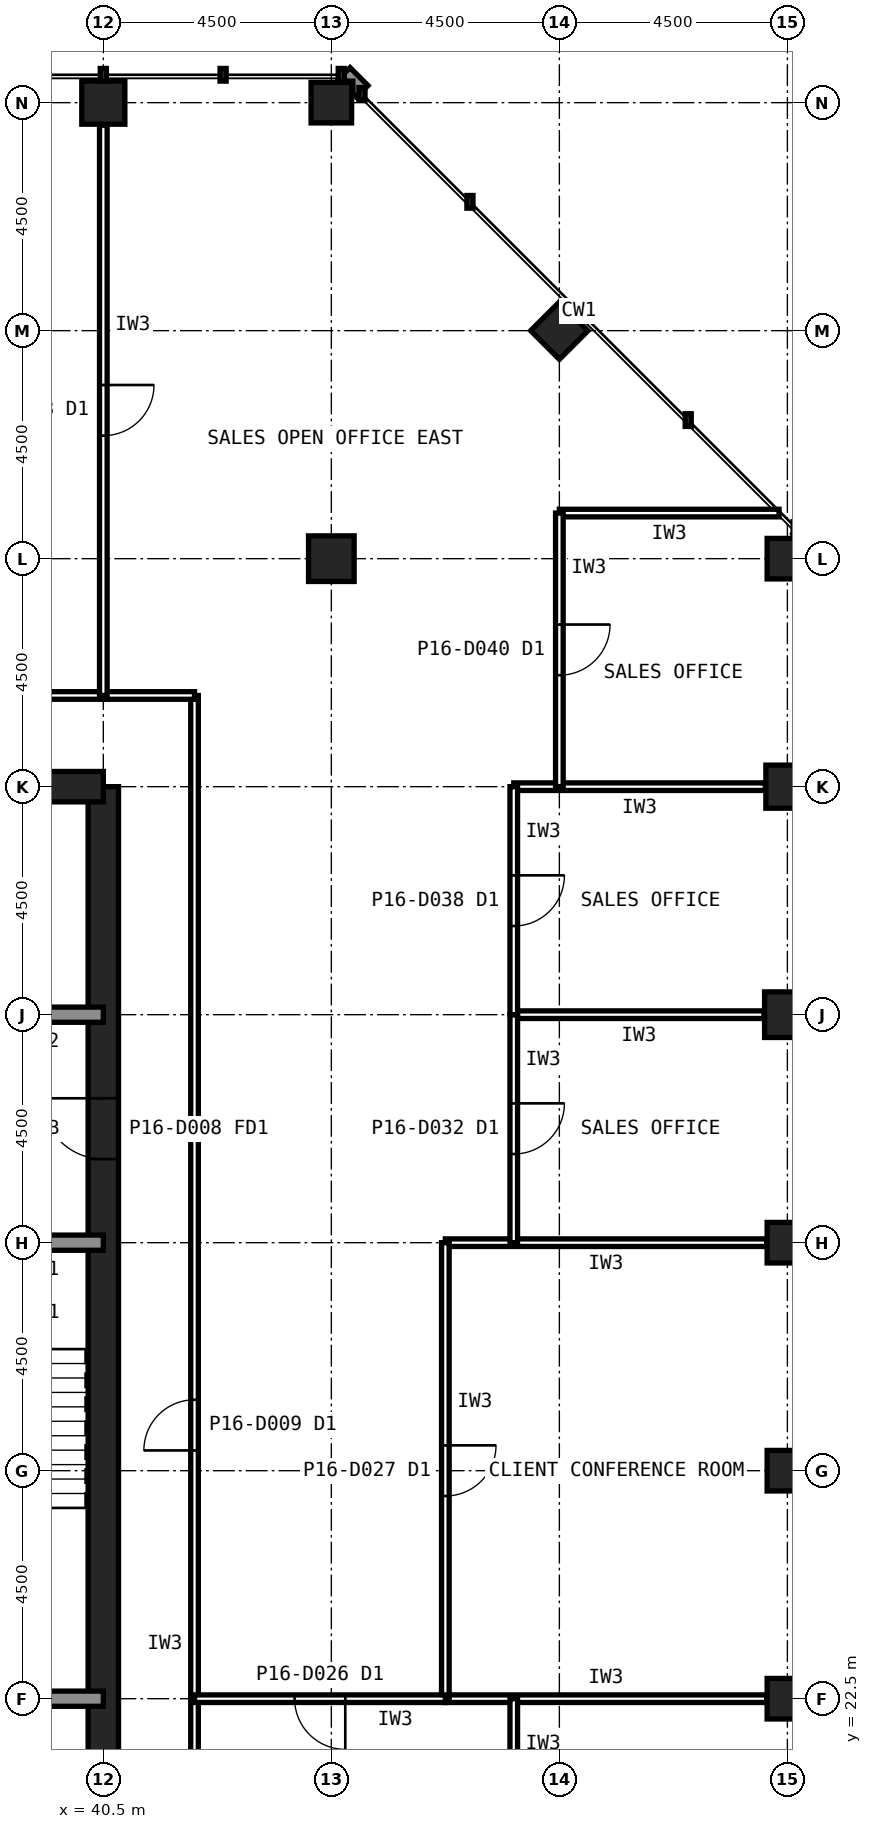
"""IFC4 building model, lengths in metres.
Left out: names, types, materials, properties, quantities, classifications, styles, units other than length and angle.
Written with IfcOpenShell. Run it as: python <this file> out.ifc"""

import sys

from ifc_helpers import new_model, si_unit, direction, frame, frame_2d, origin, origin_2d, place, context, subcontext, project, spatial, rectangle, hollow_rectangle, extrude, element, fill, save


model = new_model("IFC4")
c1 = context("Model", 3, precision=1e-05, world=origin(), true_north=direction((0.0, 1.0)))
c2 = subcontext(c1, "Body", "Model", "MODEL_VIEW")
j1 = project(units=[si_unit("LENGTHUNIT", "METRE"), si_unit("PLANEANGLEUNIT", "RADIAN")], contexts=[c1])
p1 = place(None, origin())
s1 = spatial("IfcSite", under=j1, at=p1, CompositionType="ELEMENT")
p2 = place(p1, origin())
s2 = spatial("IfcBuilding", under=s1, at=p2, CompositionType="ELEMENT")
p3 = place(p2, frame((0.0, 0.0, 71.0)))
s3 = spatial("IfcBuildingStorey", under=s2, at=p3, CompositionType="ELEMENT", Elevation=71.0)
for number, where, z_axis, x_axis in (
    (1, (54.0, 22.5, 0.0), (0.0, 0.0, 1.0), (1.0, 0.0, 0.0)),
    (2, (54.0, 27.0, 0.0), (0.0, 0.0, 1.0), (1.0, 0.0, 0.0)),
    (3, (54.0, 31.5, 0.0), (0.0, 0.0, 1.0), (1.0, 0.0, 0.0)),
):
    element("IfcColumn", number, at=place(p3, frame(where, z_axis=z_axis, x_axis=x_axis)), inside=s3, PredefinedType="COLUMN", context=c2, shape_type="SweptSolid", body=[
        extrude(hollow_rectangle(XDim=0.8, YDim=0.8, WallThickness=0.045, at=origin_2d()), origin(), (0.0, 0.0, 1.0), 4.2),
    ])
p4 = place(p3, frame((54.0, 36.0, 0.0), z_axis=(0.0, 0.0, 1.0), x_axis=(1.0, 0.0, 0.0)))
e4 = element("IfcColumn", 4, at=p4, inside=s3, PredefinedType="COLUMN", context=c2, shape_type="SweptSolid", body=[
    extrude(hollow_rectangle(XDim=0.9, YDim=0.9, WallThickness=0.063, at=origin_2d()), origin(), (0.0, 0.0, 1.0), 4.2),
])
p5 = place(p3, frame((54.0, 40.5, 0.0), z_axis=(0.0, 0.0, 1.0), x_axis=(1.0, 0.0, 0.0)))
e5 = element("IfcColumn", 5, at=p5, inside=s3, PredefinedType="COLUMN", context=c2, shape_type="SweptSolid", body=[
    extrude(hollow_rectangle(XDim=0.85, YDim=0.85, WallThickness=0.05, at=origin_2d()), origin(), (0.0, 0.0, 1.0), 4.2),
])
for number, where, z_axis, x_axis in (
    (6, (54.0, 45.0, 0.0), (0.0, 0.0, 1.0), (1.0, 0.0, 0.0)),
    (7, (45.0, 54.0, 0.0), (0.0, 0.0, 1.0), (1.0, 0.0, 0.0)),
):
    element("IfcColumn", number, at=place(p3, frame(where, z_axis=z_axis, x_axis=x_axis)), inside=s3, PredefinedType="COLUMN", context=c2, shape_type="SweptSolid", body=[
        extrude(hollow_rectangle(XDim=0.8, YDim=0.8, WallThickness=0.045, at=origin_2d()), origin(), (0.0, 0.0, 1.0), 4.2),
    ])
p6 = place(p3, frame((40.5, 54.0, 0.0), z_axis=(0.0, 0.0, 1.0), x_axis=(1.0, 0.0, 0.0)))
e8 = element("IfcColumn", 8, at=p6, inside=s3, PredefinedType="COLUMN", context=c2, shape_type="SweptSolid", body=[
    extrude(hollow_rectangle(XDim=0.85, YDim=0.85, WallThickness=0.05, at=origin_2d()), origin(), (0.0, 0.0, 1.0), 4.2),
])
p7 = place(p3, frame((49.5, 49.5, 0.0), z_axis=(0.0, 0.0, 1.0), x_axis=(0.707106781187, 0.707106781187, 0.0)))
e9 = element("IfcColumn", 9, at=p7, inside=s3, PredefinedType="COLUMN", context=c2, shape_type="SweptSolid", body=[
    extrude(hollow_rectangle(XDim=0.8, YDim=0.8, WallThickness=0.045, at=origin_2d()), origin(), (0.0, 0.0, 1.0), 4.2),
])
p8 = place(p3, frame((45.0, 45.0, 0.0), z_axis=(0.0, 0.0, 1.0), x_axis=(1.0, 0.0, 0.0)))
e10 = element("IfcColumn", 10, at=p8, inside=s3, PredefinedType="COLUMN", context=c2, shape_type="SweptSolid", body=[
    extrude(hollow_rectangle(XDim=0.9, YDim=0.9, WallThickness=0.063, at=origin_2d()), origin(), (0.0, 0.0, 1.0), 4.2),
])
p9 = place(p3, frame((40.5, 13.5, 0.0), z_axis=(0.0, 0.0, 1.0), x_axis=(0.0, 1.0, 0.0)))
e11 = element("IfcWall", 11, at=p9, inside=s3, PredefinedType="SHEAR", context=c2, shape_type="SweptSolid", body=[
    extrude(rectangle(XDim=27.0, YDim=0.6, at=frame_2d((13.5, 0.0))), origin(), (0.0, 0.0, 1.0), 4.2),
])
p10 = place(p9, frame((5.85, 0.0, 0.0)))
e12 = element("IfcOpeningElement", 12, at=p10, cuts=e11, PredefinedType="OPENING", context=c2, shape_type="SweptSolid", body=[
    extrude(rectangle(XDim=1.8, YDim=2.1, at=frame_2d((0.9, 1.05))), frame((0.0, 0.31, 0.0), z_axis=(0.0, -1.0, 0.0), x_axis=(1.0, 0.0, 0.0)), (0.0, 0.0, 1.0), 0.62),
])
p11 = place(p9, frame((19.65, 0.0, 0.0)))
e13 = element("IfcOpeningElement", 13, at=p11, cuts=e11, PredefinedType="OPENING", context=c2, shape_type="SweptSolid", body=[
    extrude(rectangle(XDim=1.2, YDim=2.1, at=frame_2d((0.6, 1.05))), frame((0.0, 0.31, 0.0), z_axis=(0.0, -1.0, 0.0), x_axis=(1.0, 0.0, 0.0)), (0.0, 0.0, 1.0), 0.62),
])
p12 = place(p3, frame((40.5, 40.5, 0.0), z_axis=(0.0, 0.0, 1.0), x_axis=(-1.0, 0.0, 0.0)))
e14 = element("IfcWall", 14, at=p12, inside=s3, PredefinedType="SHEAR", context=c2, shape_type="SweptSolid", body=[
    extrude(rectangle(XDim=27.0, YDim=0.6, at=frame_2d((13.5, 0.0))), origin(), (0.0, 0.0, 1.0), 4.2),
])
p13 = place(p3, frame((13.5, 36.0, 0.0), z_axis=(0.0, 0.0, 1.0), x_axis=(1.0, 0.0, 0.0)))
e15 = element("IfcWall", 15, at=p13, inside=s3, PredefinedType="SOLIDWALL", context=c2, shape_type="SweptSolid", body=[
    extrude(rectangle(XDim=27.0, YDim=0.3, at=frame_2d((13.5, 0.0))), origin(), (0.0, 0.0, 1.0), 4.04),
])
p14 = place(p13, frame((1.8, 0.0, 0.0)))
e16 = element("IfcOpeningElement", 16, at=p14, cuts=e15, PredefinedType="OPENING", context=c2, shape_type="SweptSolid", body=[
    extrude(rectangle(XDim=0.9, YDim=2.1, at=frame_2d((0.45, 1.05))), frame((0.0, 0.16, 0.0), z_axis=(0.0, -1.0, 0.0), x_axis=(1.0, 0.0, 0.0)), (0.0, 0.0, 1.0), 0.32),
])
p15 = place(p13, frame((24.1, 0.0, 0.0)))
e17 = element("IfcOpeningElement", 17, at=p15, cuts=e15, PredefinedType="OPENING", context=c2, shape_type="SweptSolid", body=[
    extrude(rectangle(XDim=1.3, YDim=2.2, at=frame_2d((0.65, 1.1))), frame((0.0, 0.16, 0.0), z_axis=(0.0, -1.0, 0.0), x_axis=(1.0, 0.0, 0.0)), (0.0, 0.0, 1.0), 0.32),
])
p16 = place(p3, frame((13.5, 22.5, 0.0), z_axis=(0.0, 0.0, 1.0), x_axis=(1.0, 0.0, 0.0)))
e18 = element("IfcWall", 18, at=p16, inside=s3, PredefinedType="SOLIDWALL", context=c2, shape_type="SweptSolid", body=[
    extrude(rectangle(XDim=27.0, YDim=0.3, at=frame_2d((13.5, 0.0))), origin(), (0.0, 0.0, 1.0), 4.04),
])
p17 = place(p16, frame((1.65, 0.0, 0.0)))
e19 = element("IfcOpeningElement", 19, at=p17, cuts=e18, PredefinedType="OPENING", context=c2, shape_type="SweptSolid", body=[
    extrude(rectangle(XDim=1.2, YDim=2.1, at=frame_2d((0.6, 1.05))), frame((0.0, 0.16, 0.0), z_axis=(0.0, -1.0, 0.0), x_axis=(1.0, 0.0, 0.0)), (0.0, 0.0, 1.0), 0.32),
])
p18 = place(p16, frame((6.025, 0.0, 0.0)))
e20 = element("IfcOpeningElement", 20, at=p18, cuts=e18, PredefinedType="OPENING", context=c2, shape_type="SweptSolid", body=[
    extrude(rectangle(XDim=1.0, YDim=2.1, at=frame_2d((0.5, 1.05))), frame((0.0, 0.16, 0.0), z_axis=(0.0, -1.0, 0.0), x_axis=(1.0, 0.0, 0.0)), (0.0, 0.0, 1.0), 0.32),
])
p19 = place(p16, frame((10.525, 0.0, 0.0)))
e21 = element("IfcOpeningElement", 21, at=p19, cuts=e18, PredefinedType="OPENING", context=c2, shape_type="SweptSolid", body=[
    extrude(rectangle(XDim=1.0, YDim=2.1, at=frame_2d((0.5, 1.05))), frame((0.0, 0.16, 0.0), z_axis=(0.0, -1.0, 0.0), x_axis=(1.0, 0.0, 0.0)), (0.0, 0.0, 1.0), 0.32),
])
p20 = place(p16, frame((19.75, 0.0, 0.0)))
e22 = element("IfcOpeningElement", 22, at=p20, cuts=e18, PredefinedType="OPENING", context=c2, shape_type="SweptSolid", body=[
    extrude(rectangle(XDim=1.0, YDim=2.1, at=frame_2d((0.5, 1.05))), frame((0.0, 0.16, 0.0), z_axis=(0.0, -1.0, 0.0), x_axis=(1.0, 0.0, 0.0)), (0.0, 0.0, 1.0), 0.32),
])
p21 = place(p16, frame((15.05, 0.0, 0.0)))
e23 = element("IfcOpeningElement", 23, at=p21, cuts=e18, PredefinedType="OPENING", context=c2, shape_type="SweptSolid", body=[
    extrude(rectangle(XDim=1.4, YDim=2.4, at=frame_2d((0.7, 1.2))), frame((0.0, 0.16, 0.0), z_axis=(0.0, -1.0, 0.0), x_axis=(1.0, 0.0, 0.0)), (0.0, 0.0, 1.0), 0.32),
])
p22 = place(p3, frame((13.5, 31.5, 0.0), z_axis=(0.0, 0.0, 1.0), x_axis=(1.0, 0.0, 0.0)))
e24 = element("IfcWall", 24, at=p22, inside=s3, PredefinedType="SOLIDWALL", context=c2, shape_type="SweptSolid", body=[
    extrude(rectangle(XDim=27.0, YDim=0.3, at=frame_2d((13.5, 0.0))), origin(), (0.0, 0.0, 1.0), 4.04),
])
p23 = place(p22, frame((24.15, 0.0, 0.0)))
e25 = element("IfcOpeningElement", 25, at=p23, cuts=e24, PredefinedType="OPENING", context=c2, shape_type="SweptSolid", body=[
    extrude(rectangle(XDim=1.2, YDim=2.1, at=frame_2d((0.6, 1.05))), frame((0.0, 0.16, 0.0), z_axis=(0.0, -1.0, 0.0), x_axis=(1.0, 0.0, 0.0)), (0.0, 0.0, 1.0), 0.32),
])
p24 = place(p22, frame((15.3, 0.0, 0.0)))
e26 = element("IfcOpeningElement", 26, at=p24, cuts=e24, PredefinedType="OPENING", context=c2, shape_type="SweptSolid", body=[
    extrude(rectangle(XDim=0.9, YDim=2.1, at=frame_2d((0.45, 1.05))), frame((0.0, 0.16, 0.0), z_axis=(0.0, -1.0, 0.0), x_axis=(1.0, 0.0, 0.0)), (0.0, 0.0, 1.0), 0.32),
])
p25 = place(p22, frame((19.8, 0.0, 0.0)))
e27 = element("IfcOpeningElement", 27, at=p25, cuts=e24, PredefinedType="OPENING", context=c2, shape_type="SweptSolid", body=[
    extrude(rectangle(XDim=0.9, YDim=2.1, at=frame_2d((0.45, 1.05))), frame((0.0, 0.16, 0.0), z_axis=(0.0, -1.0, 0.0), x_axis=(1.0, 0.0, 0.0)), (0.0, 0.0, 1.0), 0.32),
])
p26 = place(p3, frame((42.3, 13.5, 0.0), z_axis=(0.0, 0.0, 1.0), x_axis=(0.0, 1.0, 0.0)))
e28 = element("IfcWall", 28, at=p26, inside=s3, PredefinedType="PARTITIONING", context=c2, shape_type="SweptSolid", body=[
    extrude(rectangle(XDim=28.8, YDim=0.15, at=frame_2d((14.4, 0.0))), origin(), (0.0, 0.0, 1.0), 4.04),
])
p27 = place(p26, frame((13.9, 0.0, 0.0)))
e29 = element("IfcOpeningElement", 29, at=p27, cuts=e28, PredefinedType="OPENING", context=c2, shape_type="SweptSolid", body=[
    extrude(rectangle(XDim=1.0, YDim=2.1, at=frame_2d((0.5, 1.05))), frame((0.0, 0.085, 0.0), z_axis=(0.0, -1.0, 0.0), x_axis=(1.0, 0.0, 0.0)), (0.0, 0.0, 1.0), 0.17),
])
p28 = place(p3, frame((42.3, 42.3, 0.0), z_axis=(0.0, 0.0, 1.0), x_axis=(-1.0, 0.0, 0.0)))
e30 = element("IfcWall", 30, at=p28, inside=s3, PredefinedType="PARTITIONING", context=c2, shape_type="SweptSolid", body=[
    extrude(rectangle(XDim=13.5, YDim=0.15, at=frame_2d((6.75, 0.0))), origin(), (0.0, 0.0, 1.0), 4.04),
])
p29 = place(p28, frame((6.25, 0.0, 0.0)))
e31 = element("IfcOpeningElement", 31, at=p29, cuts=e30, PredefinedType="OPENING", context=c2, shape_type="SweptSolid", body=[
    extrude(rectangle(XDim=1.0, YDim=2.1, at=frame_2d((0.5, 1.05))), frame((0.0, 0.085, 0.0), z_axis=(0.0, -1.0, 0.0), x_axis=(1.0, 0.0, 0.0)), (0.0, 0.0, 1.0), 0.17),
])
for number, where, z_axis, x_axis in (
    (32, (47.25, 22.5, 0.0), (0.0, 0.0, 1.0), (1.0, 0.0, 0.0)),
    (33, (53.59, 31.5, 0.0), (0.0, 0.0, 1.0), (-1.0, 0.0, 0.0)),
):
    element("IfcWall", number, at=place(p3, frame(where, z_axis=z_axis, x_axis=x_axis)), inside=s3, PredefinedType="PARTITIONING", context=c2, shape_type="SweptSolid", body=[
        extrude(rectangle(XDim=6.34, YDim=0.15, at=frame_2d((3.17, 0.0))), origin(), (0.0, 0.0, 1.0), 3.189),
    ])
p30 = place(p3, frame((47.25, 31.5, 0.0), z_axis=(0.0, 0.0, 1.0), x_axis=(0.0, -1.0, 0.0)))
e34 = element("IfcWall", 34, at=p30, inside=s3, PredefinedType="PARTITIONING", context=c2, shape_type="SweptSolid", body=[
    extrude(rectangle(XDim=9.0, YDim=0.15, at=frame_2d((4.5, 0.0))), origin(), (0.0, 0.0, 1.0), 4.04),
])
p31 = place(p30, frame((4.0, 0.0, 0.0)))
e35 = element("IfcOpeningElement", 35, at=p31, cuts=e34, PredefinedType="OPENING", context=c2, shape_type="SweptSolid", body=[
    extrude(rectangle(XDim=1.0, YDim=2.1, at=frame_2d((0.5, 1.05))), frame((0.0, 0.085, 0.0), z_axis=(0.0, -1.0, 0.0), x_axis=(1.0, 0.0, 0.0)), (0.0, 0.0, 1.0), 0.17),
])
p32 = place(p3, frame((48.6, 22.5, 0.0), z_axis=(0.0, 0.0, 1.0), x_axis=(0.0, -1.0, 0.0)))
e36 = element("IfcWall", 36, at=p32, inside=s3, PredefinedType="PARTITIONING", context=c2, shape_type="SweptSolid", body=[
    extrude(rectangle(XDim=4.5, YDim=0.15, at=frame_2d((2.25, 0.0))), origin(), (0.0, 0.0, 1.0), 4.04),
])
p33 = place(p32, frame((1.75, 0.0, 0.0)))
e37 = element("IfcOpeningElement", 37, at=p33, cuts=e36, PredefinedType="OPENING", context=c2, shape_type="SweptSolid", body=[
    extrude(rectangle(XDim=1.0, YDim=2.1, at=frame_2d((0.5, 1.05))), frame((0.0, 0.085, 0.0), z_axis=(0.0, -1.0, 0.0), x_axis=(1.0, 0.0, 0.0)), (0.0, 0.0, 1.0), 0.17),
])
p34 = place(p3, frame((53.54, 36.0, 0.0), z_axis=(0.0, 0.0, 1.0), x_axis=(-1.0, 0.0, 0.0)))
e38 = element("IfcWall", 38, at=p34, inside=s3, PredefinedType="PARTITIONING", context=c2, shape_type="SweptSolid", body=[
    extrude(rectangle(XDim=4.94, YDim=0.15, at=frame_2d((2.47, 0.0))), origin(), (0.0, 0.0, 1.0), 3.189),
])
p35 = place(p3, frame((48.6, 36.0, 0.0), z_axis=(0.0, 0.0, 1.0), x_axis=(0.0, -1.0, 0.0)))
e39 = element("IfcWall", 39, at=p35, inside=s3, PredefinedType="PARTITIONING", context=c2, shape_type="SweptSolid", body=[
    extrude(rectangle(XDim=4.5, YDim=0.15, at=frame_2d((2.25, 0.0))), origin(), (0.0, 0.0, 1.0), 4.04),
])
p36 = place(p35, frame((1.75, 0.0, 0.0)))
e40 = element("IfcOpeningElement", 40, at=p36, cuts=e39, PredefinedType="OPENING", context=c2, shape_type="SweptSolid", body=[
    extrude(rectangle(XDim=1.0, YDim=2.1, at=frame_2d((0.5, 1.05))), frame((0.0, 0.085, 0.0), z_axis=(0.0, -1.0, 0.0), x_axis=(1.0, 0.0, 0.0)), (0.0, 0.0, 1.0), 0.17),
])
p37 = place(p3, frame((53.565, 40.5, 0.0), z_axis=(0.0, 0.0, 1.0), x_axis=(-1.0, 0.0, 0.0)))
e41 = element("IfcWall", 41, at=p37, inside=s3, PredefinedType="PARTITIONING", context=c2, shape_type="SweptSolid", body=[
    extrude(rectangle(XDim=4.965, YDim=0.15, at=frame_2d((2.482, 0.0))), origin(), (0.0, 0.0, 1.0), 3.189),
])
p38 = place(p3, frame((48.6, 40.5, 0.0), z_axis=(0.0, 0.0, 1.0), x_axis=(0.0, -1.0, 0.0)))
e42 = element("IfcWall", 42, at=p38, inside=s3, PredefinedType="PARTITIONING", context=c2, shape_type="SweptSolid", body=[
    extrude(rectangle(XDim=4.5, YDim=0.15, at=frame_2d((2.25, 0.0))), origin(), (0.0, 0.0, 1.0), 4.04),
])
p39 = place(p38, frame((1.75, 0.0, 0.0)))
e43 = element("IfcOpeningElement", 43, at=p39, cuts=e42, PredefinedType="OPENING", context=c2, shape_type="SweptSolid", body=[
    extrude(rectangle(XDim=1.0, YDim=2.1, at=frame_2d((0.5, 1.05))), frame((0.0, 0.085, 0.0), z_axis=(0.0, -1.0, 0.0), x_axis=(1.0, 0.0, 0.0)), (0.0, 0.0, 1.0), 0.17),
])
p40 = place(p3, frame((53.835, 45.9, 0.0), z_axis=(0.0, 0.0, 1.0), x_axis=(-1.0, 0.0, 0.0)))
e44 = element("IfcWall", 44, at=p40, inside=s3, PredefinedType="PARTITIONING", context=c2, shape_type="SweptSolid", body=[
    extrude(rectangle(XDim=4.335, YDim=0.15, at=frame_2d((2.168, 0.0))), origin(), (0.0, 0.0, 1.0), 4.04),
])
p41 = place(p3, frame((49.5, 45.9, 0.0), z_axis=(0.0, 0.0, 1.0), x_axis=(0.0, -1.0, 0.0)))
e45 = element("IfcWall", 45, at=p41, inside=s3, PredefinedType="PARTITIONING", context=c2, shape_type="SweptSolid", body=[
    extrude(rectangle(XDim=5.4, YDim=0.15, at=frame_2d((2.7, 0.0))), origin(), (0.0, 0.0, 1.0), 4.04),
])
p42 = place(p41, frame((2.2, 0.0, 0.0)))
e46 = element("IfcOpeningElement", 46, at=p42, cuts=e45, PredefinedType="OPENING", context=c2, shape_type="SweptSolid", body=[
    extrude(rectangle(XDim=1.0, YDim=2.1, at=frame_2d((0.5, 1.05))), frame((0.0, 0.085, 0.0), z_axis=(0.0, -1.0, 0.0), x_axis=(1.0, 0.0, 0.0)), (0.0, 0.0, 1.0), 0.17),
])
p43 = place(p3, frame((40.5, 53.555, 0.0), z_axis=(0.0, 0.0, 1.0), x_axis=(0.0, -1.0, 0.0)))
e47 = element("IfcWall", 47, at=p43, inside=s3, PredefinedType="PARTITIONING", context=c2, shape_type="SweptSolid", body=[
    extrude(rectangle(XDim=11.255, YDim=0.15, at=frame_2d((5.627, 0.0))), origin(), (0.0, 0.0, 1.0), 3.189),
])
p44 = place(p43, frame((5.127, 0.0, 0.0)))
e48 = element("IfcOpeningElement", 48, at=p44, cuts=e47, PredefinedType="OPENING", context=c2, shape_type="SweptSolid", body=[
    extrude(rectangle(XDim=1.0, YDim=2.1, at=frame_2d((0.5, 1.05))), frame((0.0, 0.085, 0.0), z_axis=(0.0, -1.0, 0.0), x_axis=(1.0, 0.0, 0.0)), (0.0, 0.0, 1.0), 0.17),
])
p45 = place(p3, frame((47.25, 22.5, 0.0), z_axis=(0.0, 0.0, 1.0), x_axis=(-1.0, 0.0, 0.0)))
e49 = element("IfcWall", 49, at=p45, inside=s3, PredefinedType="PARTITIONING", context=c2, shape_type="SweptSolid", body=[
    extrude(rectangle(XDim=4.95, YDim=0.15, at=frame_2d((2.475, 0.0))), origin(), (0.0, 0.0, 1.0), 3.189),
])
p46 = place(p45, frame((1.975, 0.0, 0.0)))
e50 = element("IfcOpeningElement", 50, at=p46, cuts=e49, PredefinedType="OPENING", context=c2, shape_type="SweptSolid", body=[
    extrude(rectangle(XDim=1.0, YDim=2.1, at=frame_2d((0.5, 1.05))), frame((0.0, 0.085, 0.0), z_axis=(0.0, -1.0, 0.0), x_axis=(1.0, 0.0, 0.0)), (0.0, 0.0, 1.0), 0.17),
])
p47 = place(p11, origin())
e51 = element("IfcDoor", 51, at=p47, inside=s3, OperationType="SINGLE_SWING_RIGHT", PredefinedType="DOOR", context=c2, shape_type="SweptSolid", body=[
    extrude(rectangle(XDim=1.2, YDim=2.1, at=frame_2d((0.6, 1.05))), frame((0.0, 0.025, 0.0), z_axis=(0.0, -1.0, 0.0), x_axis=(1.0, 0.0, 0.0)), (0.0, 0.0, 1.0), 0.05),
])
fill(e13, e51)
p48 = place(p27, origin())
e52 = element("IfcDoor", 52, at=p48, inside=s3, OperationType="SINGLE_SWING_LEFT", PredefinedType="DOOR", context=c2, shape_type="SweptSolid", body=[
    extrude(rectangle(XDim=1.0, YDim=2.1, at=frame_2d((0.5, 1.05))), frame((0.0, 0.025, 0.0), z_axis=(0.0, -1.0, 0.0), x_axis=(1.0, 0.0, 0.0)), (0.0, 0.0, 1.0), 0.05),
])
fill(e29, e52)
p49 = place(p31, origin())
e53 = element("IfcDoor", 53, at=p49, inside=s3, OperationType="SINGLE_SWING_LEFT", PredefinedType="DOOR", context=c2, shape_type="SweptSolid", body=[
    extrude(rectangle(XDim=1.0, YDim=2.1, at=frame_2d((0.5, 1.05))), frame((0.0, 0.025, 0.0), z_axis=(0.0, -1.0, 0.0), x_axis=(1.0, 0.0, 0.0)), (0.0, 0.0, 1.0), 0.05),
])
fill(e35, e53)
p50 = place(p36, origin())
e54 = element("IfcDoor", 54, at=p50, inside=s3, OperationType="SINGLE_SWING_LEFT", PredefinedType="DOOR", context=c2, shape_type="SweptSolid", body=[
    extrude(rectangle(XDim=1.0, YDim=2.1, at=frame_2d((0.5, 1.05))), frame((0.0, 0.025, 0.0), z_axis=(0.0, -1.0, 0.0), x_axis=(1.0, 0.0, 0.0)), (0.0, 0.0, 1.0), 0.05),
])
fill(e40, e54)
p51 = place(p39, origin())
e55 = element("IfcDoor", 55, at=p51, inside=s3, OperationType="SINGLE_SWING_LEFT", PredefinedType="DOOR", context=c2, shape_type="SweptSolid", body=[
    extrude(rectangle(XDim=1.0, YDim=2.1, at=frame_2d((0.5, 1.05))), frame((0.0, 0.025, 0.0), z_axis=(0.0, -1.0, 0.0), x_axis=(1.0, 0.0, 0.0)), (0.0, 0.0, 1.0), 0.05),
])
fill(e43, e55)
p52 = place(p42, origin())
e56 = element("IfcDoor", 56, at=p52, inside=s3, OperationType="SINGLE_SWING_LEFT", PredefinedType="DOOR", context=c2, shape_type="SweptSolid", body=[
    extrude(rectangle(XDim=1.0, YDim=2.1, at=frame_2d((0.5, 1.05))), frame((0.0, 0.025, 0.0), z_axis=(0.0, -1.0, 0.0), x_axis=(1.0, 0.0, 0.0)), (0.0, 0.0, 1.0), 0.05),
])
fill(e46, e56)
p53 = place(p44, origin())
e57 = element("IfcDoor", 57, at=p53, inside=s3, OperationType="SINGLE_SWING_LEFT", PredefinedType="DOOR", context=c2, shape_type="SweptSolid", body=[
    extrude(rectangle(XDim=1.0, YDim=2.1, at=frame_2d((0.5, 1.05))), frame((0.0, 0.025, 0.0), z_axis=(0.0, -1.0, 0.0), x_axis=(1.0, 0.0, 0.0)), (0.0, 0.0, 1.0), 0.05),
])
fill(e48, e57)
p54 = place(p46, origin())
e58 = element("IfcDoor", 58, at=p54, inside=s3, OperationType="SINGLE_SWING_LEFT", PredefinedType="DOOR", context=c2, shape_type="SweptSolid", body=[
    extrude(rectangle(XDim=1.0, YDim=2.1, at=frame_2d((0.5, 1.05))), frame((0.0, 0.025, 0.0), z_axis=(0.0, -1.0, 0.0), x_axis=(1.0, 0.0, 0.0)), (0.0, 0.0, 1.0), 0.05),
])
fill(e50, e58)
save(model, sys.argv[1])
